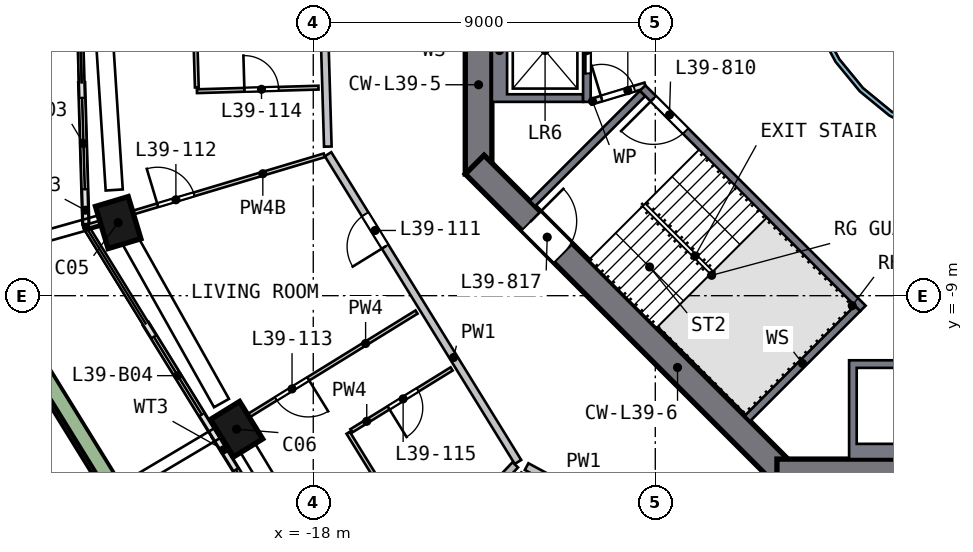
"""IFC4 building model, lengths in metres.
Left out: names, types, materials, properties, quantities, classifications, styles, units other than length and angle.
Written with IfcOpenShell. Run it as: python <this file> out.ifc"""

import sys

from ifc_helpers import new_model, si_unit, direction, frame, frame_2d, origin, origin_2d, place, context, subcontext, project, spatial, polyline, rectangle, outline, extrude, element, fill, save


model = new_model("IFC4")
c1 = context("Model", 3, precision=1e-05, world=origin(), true_north=direction((0.0, 1.0)))
c2 = subcontext(c1, "Body", "Model", "MODEL_VIEW")
j1 = project(units=[si_unit("LENGTHUNIT", "METRE"), si_unit("PLANEANGLEUNIT", "RADIAN")], contexts=[c1])
p1 = place(None, origin())
s1 = spatial("IfcSite", under=j1, at=p1, CompositionType="ELEMENT")
p2 = place(p1, origin())
s2 = spatial("IfcBuilding", under=s1, at=p2, CompositionType="ELEMENT")
p3 = place(p2, frame((0.0, 0.0, 162.0)))
s3 = spatial("IfcBuildingStorey", under=s2, at=p3, CompositionType="ELEMENT", Elevation=162.0)
p4 = place(p3, frame((-23.175, -6.944, 0.0), z_axis=(0.033983692, -0.109933824, 0.993357772), x_axis=(-0.285309883, 0.951503482, 0.115062571)))
e1 = element("IfcColumn", 1, at=p4, inside=s3, PredefinedType="COLUMN", context=c2, shape_type="SweptSolid", body=[
    extrude(rectangle(XDim=1.15, YDim=0.9, at=origin_2d()), origin(), (0.0, 0.0, 1.0), 3.211),
])
p5 = place(p3, frame((-20.091, -12.398, 0.0), z_axis=(0.059775639, -0.09506304, 0.993674943), x_axis=(0.521786787, -0.845653201, -0.112290748)))
e2 = element("IfcColumn", 2, at=p5, inside=s3, PredefinedType="COLUMN", context=c2, shape_type="SweptSolid", body=[
    extrude(rectangle(XDim=1.15, YDim=0.9, at=origin_2d()), origin(), (0.0, 0.0, 1.0), 3.21),
])
p6 = place(p3, frame((-13.65, 5.799, 0.0), z_axis=(0.0, 0.0, 1.0), x_axis=(0.0, -1.0, 0.0)))
e3 = element("IfcWall", 3, at=p6, inside=s3, PredefinedType="SHEAR", context=c2, shape_type="SweptSolid", body=[
    extrude(rectangle(XDim=11.598, YDim=0.7, at=frame_2d((5.799, 0.0))), origin(), (0.0, 0.0, 1.0), 3.5),
])
p7 = place(p6, frame((4.899, 0.0, 0.0)))
e4 = element("IfcOpeningElement", 4, at=p7, cuts=e3, PredefinedType="OPENING", context=c2, shape_type="SweptSolid", body=[
    extrude(rectangle(XDim=1.8, YDim=2.1, at=frame_2d((0.9, 1.05))), frame((0.0, 0.36, 0.0), z_axis=(0.0, -1.0, 0.0), x_axis=(1.0, 0.0, 0.0)), (0.0, 0.0, 1.0), 0.72),
])
p8 = place(p3, frame((-13.752, -5.552, 0.0), z_axis=(0.0, 0.0, 1.0), x_axis=(0.707106781, -0.707106781, 0.0)))
e5 = element("IfcWall", 5, at=p8, inside=s3, PredefinedType="SHEAR", context=c2, shape_type="SweptSolid", body=[
    extrude(rectangle(XDim=11.598, YDim=0.7, at=frame_2d((5.799, 0.0))), origin(), (0.0, 0.0, 1.0), 3.5),
])
p9 = place(p8, frame((2.099, 0.0, 0.0)))
e6 = element("IfcOpeningElement", 6, at=p9, cuts=e5, PredefinedType="OPENING", context=c2, shape_type="SweptSolid", body=[
    extrude(rectangle(XDim=1.2, YDim=2.1, at=frame_2d((0.6, 1.05))), frame((0.0, 0.36, 0.0), z_axis=(0.0, -1.0, 0.0), x_axis=(1.0, 0.0, 0.0)), (0.0, 0.0, 1.0), 0.72),
])
p10 = place(p3, frame((-5.799, -13.65, 0.0), z_axis=(0.0, 0.0, 1.0), x_axis=(1.0, 0.0, 0.0)))
e7 = element("IfcWall", 7, at=p10, inside=s3, PredefinedType="SHEAR", context=c2, shape_type="SweptSolid", body=[
    extrude(rectangle(XDim=11.598, YDim=0.7, at=frame_2d((5.799, 0.0))), origin(), (0.0, 0.0, 1.0), 3.5),
])
p11 = place(p10, frame((4.899, 0.0, 0.0)))
e8 = element("IfcOpeningElement", 8, at=p11, cuts=e7, PredefinedType="OPENING", context=c2, shape_type="SweptSolid", body=[
    extrude(rectangle(XDim=1.8, YDim=2.1, at=frame_2d((0.9, 1.05))), frame((0.0, 0.36, 0.0), z_axis=(0.0, -1.0, 0.0), x_axis=(1.0, 0.0, 0.0)), (0.0, 0.0, 1.0), 0.72),
])
p12 = place(p3, frame((-24.094, -3.397, 0.0), z_axis=(0.0, 0.0, 1.0), x_axis=(0.029283026, -0.99957116, 0.0)))
e9 = element("IfcWall", 9, at=p12, inside=s3, PredefinedType="SOLIDWALL", context=c2, shape_type="SweptSolid", body=[
    extrude(rectangle(XDim=3.71, YDim=0.15, at=frame_2d((1.855, 0.0))), origin(), (0.0, 0.0, 1.0), 2.475),
])
p13 = place(p12, frame((0.4, 0.0, 0.0)))
e10 = element("IfcOpeningElement", 10, at=p13, cuts=e9, PredefinedType="OPENING", context=c2, shape_type="SweptSolid", body=[
    extrude(rectangle(XDim=2.4, YDim=2.4, at=frame_2d((1.2, 1.2))), frame((0.0, 0.085, 0.0), z_axis=(0.0, -1.0, 0.0), x_axis=(1.0, 0.0, 0.0)), (0.0, 0.0, 1.0), 0.17),
])
p14 = place(p3, frame((-22.405, -9.743, 0.0), z_axis=(0.0, 0.0, 1.0), x_axis=(0.525159292, -0.851003947, 0.0)))
e11 = element("IfcWall", 11, at=p14, inside=s3, PredefinedType="SOLIDWALL", context=c2, shape_type="SweptSolid", body=[
    extrude(rectangle(XDim=3.475, YDim=0.15, at=frame_2d((1.738, 0.0))), origin(), (0.0, 0.0, 1.0), 2.475),
])
p15 = place(p14, frame((0.4, 0.0, 0.0)))
e12 = element("IfcOpeningElement", 12, at=p15, cuts=e11, PredefinedType="OPENING", context=c2, shape_type="SweptSolid", body=[
    extrude(rectangle(XDim=2.4, YDim=2.4, at=frame_2d((1.2, 1.2))), frame((0.0, 0.085, 0.0), z_axis=(0.0, -1.0, 0.0), x_axis=(1.0, 0.0, 0.0)), (0.0, 0.0, 1.0), 0.17),
])
p16 = place(p3, frame((-20.58, -12.7, 0.0), z_axis=(0.0, 0.0, 1.0), x_axis=(0.525155391, -0.851006354, 0.0)))
e13 = element("IfcWall", 13, at=p16, inside=s3, PredefinedType="SOLIDWALL", context=c2, shape_type="SweptSolid", body=[
    extrude(rectangle(XDim=3.835, YDim=0.15, at=frame_2d((1.918, 0.0))), origin(), (0.0, 0.0, 1.0), 2.475),
])
p17 = place(p16, frame((1.035, 0.0, 0.0)))
e14 = element("IfcOpeningElement", 14, at=p17, cuts=e13, PredefinedType="OPENING", context=c2, shape_type="SweptSolid", body=[
    extrude(rectangle(XDim=2.4, YDim=2.4, at=frame_2d((1.2, 1.2))), frame((0.0, 0.085, 0.0), z_axis=(0.0, -1.0, 0.0), x_axis=(1.0, 0.0, 0.0)), (0.0, 0.0, 1.0), 0.17),
])
p18 = place(p3, frame((-26.948, -8.142, 0.0), z_axis=(0.0, 0.0, 1.0), x_axis=(0.525181892, -0.85099, 0.0)))
e15 = element("IfcWall", 15, at=p18, inside=s3, PredefinedType="SOLIDWALL", context=c2, shape_type="SweptSolid", body=[
    extrude(rectangle(XDim=13.723, YDim=0.5, at=frame_2d((6.862, 0.0))), origin(), (0.0, 0.0, 1.0), 0.7),
])
p19 = place(p3, origin())
e16 = element("IfcWall", 16, at=p19, inside=s3, PredefinedType="SOLIDWALL", context=c2, shape_type="SweptSolid", body=[
    extrude(outline(polyline([(-13.3, -3.9), (-13.3, -1.2), (-10.9, -1.2), (-10.9, -1.4), (-12.9, -1.4), (-12.9, -3.7), (-10.9, -3.7), (-10.9, -3.9), (-13.3, -3.9)])), origin(), (0.0, 0.0, 1.0), 3.19),
])
p20 = place(p3, frame((-10.8, -1.2, 0.0), z_axis=(0.0, 0.0, 1.0), x_axis=(0.0, -1.0, 0.0)))
e17 = element("IfcWall", 17, at=p20, inside=s3, PredefinedType="SOLIDWALL", context=c2, shape_type="SweptSolid", body=[
    extrude(rectangle(XDim=2.7, YDim=0.2, at=frame_2d((1.35, 0.0))), origin(), (0.0, 0.0, 1.0), 3.19),
])
p21 = place(p20, frame((0.75, 0.0, 0.0)))
e18 = element("IfcOpeningElement", 18, at=p21, cuts=e17, PredefinedType="OPENING", context=c2, shape_type="SweptSolid", body=[
    extrude(rectangle(XDim=1.2, YDim=2.1, at=frame_2d((0.6, 1.05))), frame((0.0, 0.11, 0.0), z_axis=(0.0, -1.0, 0.0), x_axis=(1.0, 0.0, 0.0)), (0.0, 0.0, 1.0), 0.22),
])
p22 = place(p3, origin())
e19 = element("IfcWall", 19, at=p22, inside=s3, PredefinedType="SOLIDWALL", context=c2, shape_type="SweptSolid", body=[
    extrude(outline(polyline([(-1.2, -13.3), (-3.9, -13.3), (-3.9, -10.7), (-1.2, -10.7), (-1.2, -13.3)]), holes=[polyline([(-3.7, -10.9), (-3.7, -12.9), (-1.4, -12.9), (-1.4, -10.9), (-3.7, -10.9)])]), origin(), (0.0, 0.0, 1.0), 3.19),
])
p23 = place(p3, frame((-3.535, -9.334, 0.0), z_axis=(0.0, 0.0, 1.0), x_axis=(-0.707106781, 0.707106781, 0.0)))
e20 = element("IfcWall", 20, at=p23, inside=s3, PredefinedType="SOLIDWALL", context=c2, shape_type="SweptSolid", body=[
    extrude(rectangle(XDim=8.2, YDim=0.2, at=frame_2d((4.1, 0.0))), origin(), (0.0, 0.0, 1.0), 3.19),
])
p24 = place(p23, frame((6.6, 0.0, 0.0)))
e21 = element("IfcOpeningElement", 21, at=p24, cuts=e20, PredefinedType="OPENING", context=c2, shape_type="SweptSolid", body=[
    extrude(rectangle(XDim=1.2, YDim=2.1, at=frame_2d((0.6, 1.05))), frame((0.0, 0.11, 0.0), z_axis=(0.0, -1.0, 0.0), x_axis=(1.0, 0.0, 0.0)), (0.0, 0.0, 1.0), 0.22),
])
for number, where, z_axis, x_axis in (
    (22, (-9.334, -3.677, 0.0), (0.0, 0.0, 1.0), (-0.707, -0.707, 0.0)),
    (23, (-3.677, -9.334, 0.0), (0.0, 0.0, 1.0), (-0.707, -0.707, 0.0)),
):
    element("IfcWall", number, at=place(p3, frame(where, z_axis=z_axis, x_axis=x_axis)), inside=s3, PredefinedType="SOLIDWALL", context=c2, shape_type="SweptSolid", body=[
        extrude(rectangle(XDim=4.1, YDim=0.2, at=frame_2d((2.05, 0.0))), origin(), (0.0, 0.0, 1.0), 3.19),
    ])
p25 = place(p3, frame((-10.7, -3.9, 0.0), z_axis=(0.0, 0.0, 1.0), x_axis=(0.957084567, 0.289808785, 0.0)))
e24 = element("IfcWall", 24, at=p25, inside=s3, PredefinedType="PARTITIONING", context=c2, shape_type="SweptSolid", body=[
    extrude(rectangle(XDim=1.501, YDim=0.15, at=frame_2d((0.75, 0.0))), origin(), (0.0, 0.0, 1.0), 3.19),
])
p26 = place(p25, frame((0.301, 0.0, 0.0)))
e25 = element("IfcOpeningElement", 25, at=p26, cuts=e24, PredefinedType="OPENING", context=c2, shape_type="SweptSolid", body=[
    extrude(rectangle(XDim=0.9, YDim=2.1, at=frame_2d((0.45, 1.05))), frame((0.0, 0.085, 0.0), z_axis=(0.0, -1.0, 0.0), x_axis=(1.0, 0.0, 0.0)), (0.0, 0.0, 1.0), 0.17),
])
p27 = place(p3, origin())
e26 = element("IfcWall", 26, at=p27, inside=s3, PredefinedType="SOLIDWALL", context=c2, shape_type="SweptSolid", body=[
    extrude(outline(polyline([(5.021, -0.999), (4.73, -1.959), (4.257, -2.844), (3.62, -3.62), (2.844, -4.257), (1.959, -4.73), (0.999, -5.021), (0.0, -5.12), (-0.999, -5.021), (-1.959, -4.73), (-2.844, -4.257), (-3.62, -3.62), (-4.257, -2.844), (-4.73, -1.959), (-5.021, -0.999), (-5.12, 0.0), (-5.021, 0.999), (-4.73, 1.959), (-4.257, 2.844), (-3.62, 3.62), (-2.844, 4.257), (-1.959, 4.73), (-0.999, 5.021), (0.0, 5.12), (0.999, 5.021), (1.959, 4.73), (2.844, 4.257), (3.62, 3.62), (4.257, 2.844), (4.73, 1.959), (5.021, 0.999), (5.12, 0.0), (5.021, -0.999)]), holes=[polyline([(4.904, 0.976), (4.619, 1.913), (4.157, 2.778), (3.535, 3.535), (2.778, 4.157), (1.913, 4.619), (0.976, 4.904), (0.0, 5.0), (-0.976, 4.904), (-1.913, 4.619), (-2.778, 4.157), (-3.535, 3.535), (-4.157, 2.778), (-4.619, 1.913), (-4.904, 0.976), (-5.0, 0.0), (-4.904, -0.976), (-4.619, -1.913), (-4.157, -2.778), (-3.535, -3.535), (-2.778, -4.157), (-1.913, -4.619), (-0.976, -4.904), (0.0, -5.0), (0.976, -4.904), (1.913, -4.619), (2.778, -4.157), (3.535, -3.535), (4.157, -2.778), (4.619, -1.913), (4.904, -0.976), (5.0, 0.0), (4.904, 0.976)])]), origin(), (0.0, 0.0, 1.0), 3.19),
])
p28 = place(p3, frame((-17.884, 4.036, 0.0), z_axis=(0.0, 0.0, 1.0), x_axis=(0.029297532, -0.999570735, 0.0)))
e27 = element("IfcWall", 27, at=p28, inside=s3, PredefinedType="SOLIDWALL", context=c2, shape_type="SweptSolid", body=[
    extrude(rectangle(XDim=9.116, YDim=0.2, at=frame_2d((4.558, 0.0))), origin(), (0.0, 0.0, 1.0), 3.19),
])
p29 = place(p3, frame((-12.613, -13.375, 0.0), z_axis=(0.0, 0.0, 1.0), x_axis=(-0.525166229, 0.850999666, 0.0)))
e28 = element("IfcWall", 28, at=p29, inside=s3, PredefinedType="SOLIDWALL", context=c2, shape_type="SweptSolid", body=[
    extrude(rectangle(XDim=9.517, YDim=0.2, at=frame_2d((4.758, 0.0))), origin(), (0.0, 0.0, 1.0), 3.19),
])
p30 = place(p29, frame((6.658, 0.0, 0.0)))
e29 = element("IfcOpeningElement", 29, at=p30, cuts=e28, PredefinedType="OPENING", context=c2, shape_type="SweptSolid", body=[
    extrude(rectangle(XDim=1.0, YDim=2.1, at=frame_2d((0.5, 1.05))), frame((0.0, 0.11, 0.0), z_axis=(0.0, -1.0, 0.0), x_axis=(1.0, 0.0, 0.0)), (0.0, 0.0, 1.0), 0.22),
])
p31 = place(p3, frame((-12.386, -13.498, 0.0), z_axis=(0.0, 0.0, 1.0), x_axis=(0.880307349, -0.474403806, 0.0)))
e30 = element("IfcWall", 30, at=p31, inside=s3, PredefinedType="SOLIDWALL", context=c2, shape_type="SweptSolid", body=[
    extrude(rectangle(XDim=3.4, YDim=0.2, at=frame_2d((1.7, 0.0))), origin(), (0.0, 0.0, 1.0), 3.19),
])
p32 = place(p3, frame((-12.684, -13.451, 0.0), z_axis=(0.0, 0.0, 1.0), x_axis=(-0.686115547, -0.727492581, 0.0)))
e31 = element("IfcWall", 31, at=p32, inside=s3, PredefinedType="SOLIDWALL", context=c2, shape_type="SweptSolid", body=[
    extrude(rectangle(XDim=3.416, YDim=0.2, at=frame_2d((1.708, 0.0))), origin(), (0.0, 0.0, 1.0), 3.19),
])
p33 = place(p3, frame((-21.143, -0.82, 0.0), z_axis=(0.0, 0.0, 1.0), x_axis=(0.029298074, -0.999570719, 0.0)))
e32 = element("IfcWall", 32, at=p33, inside=s3, PredefinedType="PARTITIONING", context=c2, shape_type="SweptSolid", body=[
    extrude(rectangle(XDim=2.7, YDim=0.1, at=frame_2d((1.35, 0.0))), origin(), (0.0, 0.0, 1.0), 3.19),
])
p34 = place(p3, frame((-23.914, -7.165, 0.0), z_axis=(0.0, 0.0, 1.0), x_axis=(0.957926876, 0.28701237, 0.0)))
e33 = element("IfcWall", 33, at=p34, inside=s3, PredefinedType="PARTITIONING", context=c2, shape_type="SweptSolid", body=[
    extrude(rectangle(XDim=6.476, YDim=0.1, at=frame_2d((3.238, 0.0))), origin(), (0.0, 0.0, 1.0), 2.69),
])
p35 = place(p34, frame((1.9, 0.0, 0.0)))
e34 = element("IfcOpeningElement", 34, at=p35, cuts=e33, PredefinedType="OPENING", context=c2, shape_type="SweptSolid", body=[
    extrude(rectangle(XDim=1.0, YDim=2.1, at=frame_2d((0.5, 1.05))), frame((0.0, 0.06, 0.0), z_axis=(0.0, -1.0, 0.0), x_axis=(1.0, 0.0, 0.0)), (0.0, 0.0, 1.0), 0.12),
])
p36 = place(p3, frame((-21.061, -3.619, 0.0), z_axis=(0.0, 0.0, 1.0), x_axis=(0.999570717, 0.029298157, 0.0)))
e35 = element("IfcWall", 35, at=p36, inside=s3, PredefinedType="PARTITIONING", context=c2, shape_type="SweptSolid", body=[
    extrude(rectangle(XDim=3.2, YDim=0.1, at=frame_2d((1.6, 0.0))), origin(), (0.0, 0.0, 1.0), 3.19),
])
p37 = place(p36, frame((1.25, 0.0, 0.0)))
e36 = element("IfcOpeningElement", 36, at=p37, cuts=e35, PredefinedType="OPENING", context=c2, shape_type="SweptSolid", body=[
    extrude(rectangle(XDim=0.9, YDim=2.1, at=frame_2d((0.45, 1.05))), frame((0.0, 0.06, 0.0), z_axis=(0.0, -1.0, 0.0), x_axis=(1.0, 0.0, 0.0)), (0.0, 0.0, 1.0), 0.12),
])
p38 = place(p3, frame((-15.282, -9.431, 0.0), z_axis=(0.0, 0.0, 1.0), x_axis=(-0.85100204, -0.525162382, 0.0)))
e37 = element("IfcWall", 37, at=p38, inside=s3, PredefinedType="PARTITIONING", context=c2, shape_type="SweptSolid", body=[
    extrude(rectangle(XDim=6.15, YDim=0.1, at=frame_2d((3.075, 0.0))), origin(), (0.0, 0.0, 1.0), 3.19),
])
p39 = place(p38, frame((3.35, 0.0, 0.0)))
e38 = element("IfcOpeningElement", 38, at=p39, cuts=e37, PredefinedType="OPENING", context=c2, shape_type="SweptSolid", body=[
    extrude(rectangle(XDim=1.0, YDim=2.1, at=frame_2d((0.5, 1.05))), frame((0.0, 0.06, 0.0), z_axis=(0.0, -1.0, 0.0), x_axis=(1.0, 0.0, 0.0)), (0.0, 0.0, 1.0), 0.12),
])
p40 = place(p3, frame((-17.082, -12.608, 0.0), z_axis=(0.0, 0.0, 1.0), x_axis=(0.525185533, -0.850987753, 0.0)))
e39 = element("IfcWall", 39, at=p40, inside=s3, PredefinedType="PARTITIONING", context=c2, shape_type="SweptSolid", body=[
    extrude(rectangle(XDim=3.704, YDim=0.1, at=frame_2d((1.852, 0.0))), origin(), (0.0, 0.0, 1.0), 3.19),
])
p41 = place(p3, frame((-14.359, -10.927, 0.0), z_axis=(0.0, 0.0, 1.0), x_axis=(-0.850984343, -0.525191059, 0.0)))
e40 = element("IfcWall", 40, at=p41, inside=s3, PredefinedType="PARTITIONING", context=c2, shape_type="SweptSolid", body=[
    extrude(rectangle(XDim=3.1, YDim=0.1, at=frame_2d((1.55, 0.0))), origin(), (0.0, 0.0, 1.0), 3.19),
])
p42 = place(p41, frame((1.05, 0.0, 0.0)))
e41 = element("IfcOpeningElement", 41, at=p42, cuts=e40, PredefinedType="OPENING", context=c2, shape_type="SweptSolid", body=[
    extrude(rectangle(XDim=0.9, YDim=2.1, at=frame_2d((0.45, 1.05))), frame((0.0, 0.06, 0.0), z_axis=(0.0, -1.0, 0.0), x_axis=(1.0, 0.0, 0.0)), (0.0, 0.0, 1.0), 0.12),
])
p43 = place(p13, origin())
e42 = element("IfcDoor", 42, at=p43, inside=s3, OperationType="SLIDING_TO_RIGHT", PredefinedType="DOOR", context=c2, shape_type="SweptSolid", body=[
    extrude(rectangle(XDim=2.4, YDim=2.4, at=frame_2d((1.2, 1.2))), frame((0.0, 0.025, 0.0), z_axis=(0.0, -1.0, 0.0), x_axis=(1.0, 0.0, 0.0)), (0.0, 0.0, 1.0), 0.05),
])
fill(e10, e42)
p44 = place(p15, origin())
e43 = element("IfcDoor", 43, at=p44, inside=s3, OperationType="SLIDING_TO_RIGHT", PredefinedType="DOOR", context=c2, shape_type="SweptSolid", body=[
    extrude(rectangle(XDim=2.4, YDim=2.4, at=frame_2d((1.2, 1.2))), frame((0.0, 0.025, 0.0), z_axis=(0.0, -1.0, 0.0), x_axis=(1.0, 0.0, 0.0)), (0.0, 0.0, 1.0), 0.05),
])
fill(e12, e43)
p45 = place(p17, origin())
e44 = element("IfcDoor", 44, at=p45, inside=s3, OperationType="SLIDING_TO_LEFT", PredefinedType="DOOR", context=c2, shape_type="SweptSolid", body=[
    extrude(rectangle(XDim=2.4, YDim=2.4, at=frame_2d((1.2, 1.2))), frame((0.0, 0.025, 0.0), z_axis=(0.0, -1.0, 0.0), x_axis=(1.0, 0.0, 0.0)), (0.0, 0.0, 1.0), 0.05),
])
fill(e14, e44)
p46 = place(p21, origin())
e45 = element("IfcDoor", 45, at=p46, inside=s3, OperationType="DOUBLE_DOOR_SLIDING", PredefinedType="DOOR", context=c2, shape_type="SweptSolid", body=[
    extrude(rectangle(XDim=1.2, YDim=2.1, at=frame_2d((0.6, 1.05))), frame((0.0, 0.025, 0.0), z_axis=(0.0, -1.0, 0.0), x_axis=(1.0, 0.0, 0.0)), (0.0, 0.0, 1.0), 0.05),
])
fill(e18, e45)
p47 = place(p24, origin())
e46 = element("IfcDoor", 46, at=p47, inside=s3, OperationType="SINGLE_SWING_RIGHT", PredefinedType="DOOR", context=c2, shape_type="SweptSolid", body=[
    extrude(rectangle(XDim=1.2, YDim=2.1, at=frame_2d((0.6, 1.05))), frame((0.0, 0.025, 0.0), z_axis=(0.0, -1.0, 0.0), x_axis=(1.0, 0.0, 0.0)), (0.0, 0.0, 1.0), 0.05),
])
fill(e21, e46)
p48 = place(p9, origin())
e47 = element("IfcDoor", 47, at=p48, inside=s3, OperationType="SINGLE_SWING_LEFT", PredefinedType="DOOR", context=c2, shape_type="SweptSolid", body=[
    extrude(rectangle(XDim=1.2, YDim=2.1, at=frame_2d((0.6, 1.05))), frame((0.0, 0.025, 0.0), z_axis=(0.0, -1.0, 0.0), x_axis=(1.0, 0.0, 0.0)), (0.0, 0.0, 1.0), 0.05),
])
fill(e6, e47)
p49 = place(p26, origin())
e48 = element("IfcDoor", 48, at=p49, inside=s3, OperationType="SINGLE_SWING_LEFT", PredefinedType="DOOR", context=c2, shape_type="SweptSolid", body=[
    extrude(rectangle(XDim=0.9, YDim=2.1, at=frame_2d((0.45, 1.05))), frame((0.0, 0.025, 0.0), z_axis=(0.0, -1.0, 0.0), x_axis=(1.0, 0.0, 0.0)), (0.0, 0.0, 1.0), 0.05),
])
fill(e25, e48)
p50 = place(p30, origin())
e49 = element("IfcDoor", 49, at=p50, inside=s3, OperationType="SINGLE_SWING_LEFT", PredefinedType="DOOR", context=c2, shape_type="SweptSolid", body=[
    extrude(rectangle(XDim=1.0, YDim=2.1, at=frame_2d((0.5, 1.05))), frame((0.0, 0.025, 0.0), z_axis=(0.0, -1.0, 0.0), x_axis=(1.0, 0.0, 0.0)), (0.0, 0.0, 1.0), 0.05),
])
fill(e29, e49)
p51 = place(p35, origin())
e50 = element("IfcDoor", 50, at=p51, inside=s3, OperationType="SINGLE_SWING_LEFT", PredefinedType="DOOR", context=c2, shape_type="SweptSolid", body=[
    extrude(rectangle(XDim=1.0, YDim=2.1, at=frame_2d((0.5, 1.05))), frame((0.0, 0.025, 0.0), z_axis=(0.0, -1.0, 0.0), x_axis=(1.0, 0.0, 0.0)), (0.0, 0.0, 1.0), 0.05),
])
fill(e34, e50)
p52 = place(p39, origin())
e51 = element("IfcDoor", 51, at=p52, inside=s3, OperationType="SINGLE_SWING_LEFT", PredefinedType="DOOR", context=c2, shape_type="SweptSolid", body=[
    extrude(rectangle(XDim=1.0, YDim=2.1, at=frame_2d((0.5, 1.05))), frame((0.0, 0.025, 0.0), z_axis=(0.0, -1.0, 0.0), x_axis=(1.0, 0.0, 0.0)), (0.0, 0.0, 1.0), 0.05),
])
fill(e38, e51)
p53 = place(p37, origin())
e52 = element("IfcDoor", 52, at=p53, inside=s3, OperationType="SINGLE_SWING_LEFT", PredefinedType="DOOR", context=c2, shape_type="SweptSolid", body=[
    extrude(rectangle(XDim=0.9, YDim=2.1, at=frame_2d((0.45, 1.05))), frame((0.0, 0.025, 0.0), z_axis=(0.0, -1.0, 0.0), x_axis=(1.0, 0.0, 0.0)), (0.0, 0.0, 1.0), 0.05),
])
fill(e36, e52)
p54 = place(p42, origin())
e53 = element("IfcDoor", 53, at=p54, inside=s3, OperationType="SINGLE_SWING_RIGHT", PredefinedType="DOOR", context=c2, shape_type="SweptSolid", body=[
    extrude(rectangle(XDim=0.9, YDim=2.1, at=frame_2d((0.45, 1.05))), frame((0.0, 0.025, 0.0), z_axis=(0.0, -1.0, 0.0), x_axis=(1.0, 0.0, 0.0)), (0.0, 0.0, 1.0), 0.05),
])
fill(e41, e53)
save(model, sys.argv[1])
